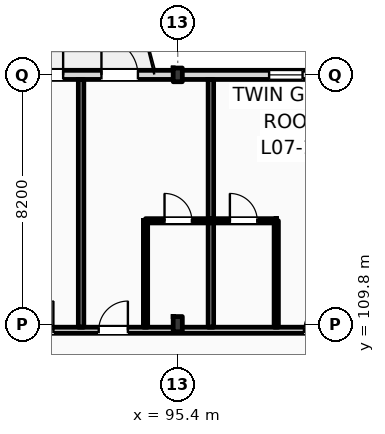
"""IFC4 building model, lengths in metres.
Left out: names, types, materials, properties, quantities, classifications, styles, units other than length and angle.
Written with IfcOpenShell. Run it as: python <this file> out.ifc"""

import sys

from ifc_helpers import new_model, si_unit, direction, frame, frame_2d, origin, origin_2d, place, context, subcontext, project, spatial, rectangle, i_section, extrude, element, fill, save


model = new_model("IFC4")
c1 = context("Model", 3, precision=1e-05, world=origin(), true_north=direction((0.0, 1.0)))
c2 = subcontext(c1, "Body", "Model", "MODEL_VIEW")
j1 = project(units=[si_unit("LENGTHUNIT", "METRE"), si_unit("PLANEANGLEUNIT", "RADIAN")], contexts=[c1])
p1 = place(None, origin())
s1 = spatial("IfcSite", under=j1, at=p1, CompositionType="ELEMENT")
p2 = place(p1, origin())
s2 = spatial("IfcBuilding", under=s1, at=p2, CompositionType="ELEMENT")
p3 = place(p2, frame((0.0, 0.0, 31.8)))
s3 = spatial("IfcBuildingStorey", under=s2, at=p3, CompositionType="ELEMENT", Elevation=31.8)
p4 = place(p3, frame((95.4, 109.8, 0.0), z_axis=(0.0, 0.0, 1.0), x_axis=(1.0, 0.0, 0.0)))
e1 = element("IfcColumn", 1, at=p4, inside=s3, PredefinedType="COLUMN", context=c2, shape_type="SweptSolid", body=[
    extrude(i_section(OverallWidth=0.3, OverallDepth=0.5, WebThickness=0.014, FlangeThickness=0.028, FilletRadius=0.027, at=origin_2d()), origin(), (0.0, 0.0, 1.0), 3.6),
])
p5 = place(p3, frame((95.4, 118.0, 0.0), z_axis=(0.0, 0.0, 1.0), x_axis=(1.0, 0.0, 0.0)))
e2 = element("IfcColumn", 2, at=p5, inside=s3, PredefinedType="COLUMN", context=c2, shape_type="SweptSolid", body=[
    extrude(i_section(OverallWidth=0.3, OverallDepth=0.45, WebThickness=0.014, FlangeThickness=0.026, FilletRadius=0.027, at=origin_2d()), origin(), (0.0, 0.0, 1.0), 3.6),
])
p6 = place(p3, frame((22.5, 118.0, 0.0), z_axis=(0.0, 0.0, 1.0), x_axis=(1.0, 0.0, 0.0)))
e3 = element("IfcWall", 3, at=p6, inside=s3, PredefinedType="STANDARD", context=c2, shape_type="SweptSolid", body=[
    extrude(rectangle(XDim=97.5, YDim=0.3, at=frame_2d((48.75, 0.0))), origin(), (0.0, 0.0, 1.0), 2.72),
])
p7 = place(p6, frame((3.61, 0.0, 0.9)))
e4 = element("IfcOpeningElement", 4, at=p7, cuts=e3, PredefinedType="OPENING", context=c2, shape_type="SweptSolid", body=[
    extrude(rectangle(XDim=1.1, YDim=1.64, at=frame_2d((0.55, 0.82))), frame((0.0, 0.16, 0.0), z_axis=(0.0, -1.0, 0.0), x_axis=(1.0, 0.0, 0.0)), (0.0, 0.0, 1.0), 0.32),
])
p8 = place(p6, frame((6.855, 0.0, 0.0)))
e5 = element("IfcOpeningElement", 5, at=p8, cuts=e3, PredefinedType="OPENING", context=c2, shape_type="SweptSolid", body=[
    extrude(rectangle(XDim=1.2, YDim=2.25, at=frame_2d((0.6, 1.125))), frame((0.0, 0.16, 0.0), z_axis=(0.0, -1.0, 0.0), x_axis=(1.0, 0.0, 0.0)), (0.0, 0.0, 1.0), 0.32),
])
p9 = place(p6, frame((11.405, 0.0, 0.9)))
e6 = element("IfcOpeningElement", 6, at=p9, cuts=e3, PredefinedType="OPENING", context=c2, shape_type="SweptSolid", body=[
    extrude(rectangle(XDim=2.1, YDim=1.64, at=frame_2d((1.05, 0.82))), frame((0.0, 0.16, 0.0), z_axis=(0.0, -1.0, 0.0), x_axis=(1.0, 0.0, 0.0)), (0.0, 0.0, 1.0), 0.32),
])
p10 = place(p6, frame((15.13, 0.0, 0.9)))
e7 = element("IfcOpeningElement", 7, at=p10, cuts=e3, PredefinedType="OPENING", context=c2, shape_type="SweptSolid", body=[
    extrude(rectangle(XDim=2.25, YDim=1.64, at=frame_2d((1.125, 0.82))), frame((0.0, 0.16, 0.0), z_axis=(0.0, -1.0, 0.0), x_axis=(1.0, 0.0, 0.0)), (0.0, 0.0, 1.0), 0.32),
])
p11 = place(p6, frame((21.53, 0.0, 0.0)))
e8 = element("IfcOpeningElement", 8, at=p11, cuts=e3, PredefinedType="OPENING", context=c2, shape_type="SweptSolid", body=[
    extrude(rectangle(XDim=1.2, YDim=2.25, at=frame_2d((0.6, 1.125))), frame((0.0, 0.16, 0.0), z_axis=(0.0, -1.0, 0.0), x_axis=(1.0, 0.0, 0.0)), (0.0, 0.0, 1.0), 0.32),
])
p12 = place(p6, frame((24.18, 0.0, 0.9)))
e9 = element("IfcOpeningElement", 9, at=p12, cuts=e3, PredefinedType="OPENING", context=c2, shape_type="SweptSolid", body=[
    extrude(rectangle(XDim=1.1, YDim=1.64, at=frame_2d((0.55, 0.82))), frame((0.0, 0.16, 0.0), z_axis=(0.0, -1.0, 0.0), x_axis=(1.0, 0.0, 0.0)), (0.0, 0.0, 1.0), 0.32),
])
p13 = place(p6, frame((29.105, 0.0, 0.9)))
e10 = element("IfcOpeningElement", 10, at=p13, cuts=e3, PredefinedType="OPENING", context=c2, shape_type="SweptSolid", body=[
    extrude(rectangle(XDim=2.7, YDim=1.64, at=frame_2d((1.35, 0.82))), frame((0.0, 0.16, 0.0), z_axis=(0.0, -1.0, 0.0), x_axis=(1.0, 0.0, 0.0)), (0.0, 0.0, 1.0), 0.32),
])
p14 = place(p6, frame((34.83, 0.0, 0.9)))
e11 = element("IfcOpeningElement", 11, at=p14, cuts=e3, PredefinedType="OPENING", context=c2, shape_type="SweptSolid", body=[
    extrude(rectangle(XDim=1.8, YDim=1.64, at=frame_2d((0.9, 0.82))), frame((0.0, 0.16, 0.0), z_axis=(0.0, -1.0, 0.0), x_axis=(1.0, 0.0, 0.0)), (0.0, 0.0, 1.0), 0.32),
])
p15 = place(p6, frame((38.525, 0.0, 0.0)))
e12 = element("IfcOpeningElement", 12, at=p15, cuts=e3, PredefinedType="OPENING", context=c2, shape_type="SweptSolid", body=[
    extrude(rectangle(XDim=1.2, YDim=2.25, at=frame_2d((0.6, 1.125))), frame((0.0, 0.16, 0.0), z_axis=(0.0, -1.0, 0.0), x_axis=(1.0, 0.0, 0.0)), (0.0, 0.0, 1.0), 0.32),
])
p16 = place(p6, frame((42.73, 0.0, 0.9)))
e13 = element("IfcOpeningElement", 13, at=p16, cuts=e3, PredefinedType="OPENING", context=c2, shape_type="SweptSolid", body=[
    extrude(rectangle(XDim=3.05, YDim=1.64, at=frame_2d((1.525, 0.82))), frame((0.0, 0.16, 0.0), z_axis=(0.0, -1.0, 0.0), x_axis=(1.0, 0.0, 0.0)), (0.0, 0.0, 1.0), 0.32),
])
p17 = place(p6, frame((47.155, 0.0, 0.9)))
e14 = element("IfcOpeningElement", 14, at=p17, cuts=e3, PredefinedType="OPENING", context=c2, shape_type="SweptSolid", body=[
    extrude(rectangle(XDim=1.35, YDim=1.64, at=frame_2d((0.675, 0.82))), frame((0.0, 0.16, 0.0), z_axis=(0.0, -1.0, 0.0), x_axis=(1.0, 0.0, 0.0)), (0.0, 0.0, 1.0), 0.32),
])
p18 = place(p6, frame((53.065, 0.0, 0.0)))
e15 = element("IfcOpeningElement", 15, at=p18, cuts=e3, PredefinedType="OPENING", context=c2, shape_type="SweptSolid", body=[
    extrude(rectangle(XDim=1.2, YDim=2.25, at=frame_2d((0.6, 1.125))), frame((0.0, 0.16, 0.0), z_axis=(0.0, -1.0, 0.0), x_axis=(1.0, 0.0, 0.0)), (0.0, 0.0, 1.0), 0.32),
])
p19 = place(p6, frame((58.2, 0.0, 0.9)))
e16 = element("IfcOpeningElement", 16, at=p19, cuts=e3, PredefinedType="OPENING", context=c2, shape_type="SweptSolid", body=[
    extrude(rectangle(XDim=1.8, YDim=1.64, at=frame_2d((0.9, 0.82))), frame((0.0, 0.16, 0.0), z_axis=(0.0, -1.0, 0.0), x_axis=(1.0, 0.0, 0.0)), (0.0, 0.0, 1.0), 0.32),
])
p20 = place(p6, frame((61.13, 0.0, 0.9)))
e17 = element("IfcOpeningElement", 17, at=p20, cuts=e3, PredefinedType="OPENING", context=c2, shape_type="SweptSolid", body=[
    extrude(rectangle(XDim=3.05, YDim=1.64, at=frame_2d((1.525, 0.82))), frame((0.0, 0.16, 0.0), z_axis=(0.0, -1.0, 0.0), x_axis=(1.0, 0.0, 0.0)), (0.0, 0.0, 1.0), 0.32),
])
p21 = place(p6, frame((67.93, 0.0, 0.0)))
e18 = element("IfcOpeningElement", 18, at=p21, cuts=e3, PredefinedType="OPENING", context=c2, shape_type="SweptSolid", body=[
    extrude(rectangle(XDim=1.2, YDim=2.25, at=frame_2d((0.6, 1.125))), frame((0.0, 0.16, 0.0), z_axis=(0.0, -1.0, 0.0), x_axis=(1.0, 0.0, 0.0)), (0.0, 0.0, 1.0), 0.32),
])
p22 = place(p6, frame((70.39, 0.0, 0.0)))
e19 = element("IfcOpeningElement", 19, at=p22, cuts=e3, PredefinedType="OPENING", context=c2, shape_type="SweptSolid", body=[
    extrude(rectangle(XDim=1.2, YDim=2.25, at=frame_2d((0.6, 1.125))), frame((0.0, 0.16, 0.0), z_axis=(0.0, -1.0, 0.0), x_axis=(1.0, 0.0, 0.0)), (0.0, 0.0, 1.0), 0.32),
])
p23 = place(p6, frame((75.905, 0.0, 0.9)))
e20 = element("IfcOpeningElement", 20, at=p23, cuts=e3, PredefinedType="OPENING", context=c2, shape_type="SweptSolid", body=[
    extrude(rectangle(XDim=1.1, YDim=1.5, at=frame_2d((0.55, 0.75))), frame((0.0, 0.16, 0.0), z_axis=(0.0, -1.0, 0.0), x_axis=(1.0, 0.0, 0.0)), (0.0, 0.0, 1.0), 0.32),
])
p24 = place(p6, frame((81.63, 0.0, 0.9)))
e21 = element("IfcOpeningElement", 21, at=p24, cuts=e3, PredefinedType="OPENING", context=c2, shape_type="SweptSolid", body=[
    extrude(rectangle(XDim=1.1, YDim=1.6, at=frame_2d((0.55, 0.8))), frame((0.0, 0.16, 0.0), z_axis=(0.0, -1.0, 0.0), x_axis=(1.0, 0.0, 0.0)), (0.0, 0.0, 1.0), 0.32),
])
p25 = place(p6, frame((84.955, 0.0, 0.9)))
e22 = element("IfcOpeningElement", 22, at=p25, cuts=e3, PredefinedType="OPENING", context=c2, shape_type="SweptSolid", body=[
    extrude(rectangle(XDim=1.4, YDim=1.64, at=frame_2d((0.7, 0.82))), frame((0.0, 0.16, 0.0), z_axis=(0.0, -1.0, 0.0), x_axis=(1.0, 0.0, 0.0)), (0.0, 0.0, 1.0), 0.32),
])
p26 = place(p6, frame((90.055, 0.0, 0.9)))
e23 = element("IfcOpeningElement", 23, at=p26, cuts=e3, PredefinedType="OPENING", context=c2, shape_type="SweptSolid", body=[
    extrude(rectangle(XDim=1.6, YDim=1.64, at=frame_2d((0.8, 0.82))), frame((0.0, 0.16, 0.0), z_axis=(0.0, -1.0, 0.0), x_axis=(1.0, 0.0, 0.0)), (0.0, 0.0, 1.0), 0.32),
])
p27 = place(p6, frame((93.87, 0.0, 0.9)))
e24 = element("IfcOpeningElement", 24, at=p27, cuts=e3, PredefinedType="OPENING", context=c2, shape_type="SweptSolid", body=[
    extrude(rectangle(XDim=1.75, YDim=1.64, at=frame_2d((0.875, 0.82))), frame((0.0, 0.16, 0.0), z_axis=(0.0, -1.0, 0.0), x_axis=(1.0, 0.0, 0.0)), (0.0, 0.0, 1.0), 0.32),
])
p28 = place(p3, frame((10.65, 109.6, 0.0), z_axis=(0.0, 0.0, 1.0), x_axis=(1.0, 0.0, 0.0)))
e25 = element("IfcWall", 25, at=p28, inside=s3, PredefinedType="PARTITIONING", context=c2, shape_type="SweptSolid", body=[
    extrude(rectangle(XDim=109.21, YDim=0.2, at=frame_2d((54.605, 0.0))), origin(), (0.0, 0.0, 1.0), 2.72),
])
p29 = place(p28, frame((15.825, 0.0, 0.0)))
e26 = element("IfcOpeningElement", 26, at=p29, cuts=e25, PredefinedType="OPENING", context=c2, shape_type="SweptSolid", body=[
    extrude(rectangle(XDim=1.02, YDim=2.2, at=frame_2d((0.51, 1.1))), frame((0.0, 0.11, 0.0), z_axis=(0.0, -1.0, 0.0), x_axis=(1.0, 0.0, 0.0)), (0.0, 0.0, 1.0), 0.22),
])
p30 = place(p28, frame((19.87, 0.0, 0.0)))
e27 = element("IfcOpeningElement", 27, at=p30, cuts=e25, PredefinedType="OPENING", context=c2, shape_type="SweptSolid", body=[
    extrude(rectangle(XDim=1.02, YDim=2.2, at=frame_2d((0.51, 1.1))), frame((0.0, 0.11, 0.0), z_axis=(0.0, -1.0, 0.0), x_axis=(1.0, 0.0, 0.0)), (0.0, 0.0, 1.0), 0.22),
])
p31 = place(p28, frame((24.47, 0.0, 0.0)))
e28 = element("IfcOpeningElement", 28, at=p31, cuts=e25, PredefinedType="OPENING", context=c2, shape_type="SweptSolid", body=[
    extrude(rectangle(XDim=1.02, YDim=2.2, at=frame_2d((0.51, 1.1))), frame((0.0, 0.11, 0.0), z_axis=(0.0, -1.0, 0.0), x_axis=(1.0, 0.0, 0.0)), (0.0, 0.0, 1.0), 0.22),
])
p32 = place(p28, frame((26.92, 0.0, 0.0)))
e29 = element("IfcOpeningElement", 29, at=p32, cuts=e25, PredefinedType="OPENING", context=c2, shape_type="SweptSolid", body=[
    extrude(rectangle(XDim=1.02, YDim=2.2, at=frame_2d((0.51, 1.1))), frame((0.0, 0.11, 0.0), z_axis=(0.0, -1.0, 0.0), x_axis=(1.0, 0.0, 0.0)), (0.0, 0.0, 1.0), 0.22),
])
p33 = place(p28, frame((33.7, 0.0, 0.0)))
e30 = element("IfcOpeningElement", 30, at=p33, cuts=e25, PredefinedType="OPENING", context=c2, shape_type="SweptSolid", body=[
    extrude(rectangle(XDim=0.96, YDim=2.2, at=frame_2d((0.48, 1.1))), frame((0.0, 0.11, 0.0), z_axis=(0.0, -1.0, 0.0), x_axis=(1.0, 0.0, 0.0)), (0.0, 0.0, 1.0), 0.22),
])
p34 = place(p28, frame((35.9, 0.0, 0.0)))
e31 = element("IfcOpeningElement", 31, at=p34, cuts=e25, PredefinedType="OPENING", context=c2, shape_type="SweptSolid", body=[
    extrude(rectangle(XDim=0.96, YDim=2.2, at=frame_2d((0.48, 1.1))), frame((0.0, 0.11, 0.0), z_axis=(0.0, -1.0, 0.0), x_axis=(1.0, 0.0, 0.0)), (0.0, 0.0, 1.0), 0.22),
])
p35 = place(p28, frame((42.9, 0.0, 0.0)))
e32 = element("IfcOpeningElement", 32, at=p35, cuts=e25, PredefinedType="OPENING", context=c2, shape_type="SweptSolid", body=[
    extrude(rectangle(XDim=0.96, YDim=2.2, at=frame_2d((0.48, 1.1))), frame((0.0, 0.11, 0.0), z_axis=(0.0, -1.0, 0.0), x_axis=(1.0, 0.0, 0.0)), (0.0, 0.0, 1.0), 0.22),
])
p36 = place(p28, frame((47.5, 0.0, 0.0)))
e33 = element("IfcOpeningElement", 33, at=p36, cuts=e25, PredefinedType="OPENING", context=c2, shape_type="SweptSolid", body=[
    extrude(rectangle(XDim=0.96, YDim=2.2, at=frame_2d((0.48, 1.1))), frame((0.0, 0.11, 0.0), z_axis=(0.0, -1.0, 0.0), x_axis=(1.0, 0.0, 0.0)), (0.0, 0.0, 1.0), 0.22),
])
p37 = place(p28, frame((49.95, 0.0, 0.0)))
e34 = element("IfcOpeningElement", 34, at=p37, cuts=e25, PredefinedType="OPENING", context=c2, shape_type="SweptSolid", body=[
    extrude(rectangle(XDim=0.96, YDim=2.2, at=frame_2d((0.48, 1.1))), frame((0.0, 0.11, 0.0), z_axis=(0.0, -1.0, 0.0), x_axis=(1.0, 0.0, 0.0)), (0.0, 0.0, 1.0), 0.22),
])
p38 = place(p28, frame((56.7, 0.0, 0.0)))
e35 = element("IfcOpeningElement", 35, at=p38, cuts=e25, PredefinedType="OPENING", context=c2, shape_type="SweptSolid", body=[
    extrude(rectangle(XDim=0.96, YDim=2.2, at=frame_2d((0.48, 1.1))), frame((0.0, 0.11, 0.0), z_axis=(0.0, -1.0, 0.0), x_axis=(1.0, 0.0, 0.0)), (0.0, 0.0, 1.0), 0.22),
])
p39 = place(p28, frame((59.15, 0.0, 0.0)))
e36 = element("IfcOpeningElement", 36, at=p39, cuts=e25, PredefinedType="OPENING", context=c2, shape_type="SweptSolid", body=[
    extrude(rectangle(XDim=0.96, YDim=2.2, at=frame_2d((0.48, 1.1))), frame((0.0, 0.11, 0.0), z_axis=(0.0, -1.0, 0.0), x_axis=(1.0, 0.0, 0.0)), (0.0, 0.0, 1.0), 0.22),
])
p40 = place(p28, frame((65.9, 0.0, 0.0)))
e37 = element("IfcOpeningElement", 37, at=p40, cuts=e25, PredefinedType="OPENING", context=c2, shape_type="SweptSolid", body=[
    extrude(rectangle(XDim=0.96, YDim=2.2, at=frame_2d((0.48, 1.1))), frame((0.0, 0.11, 0.0), z_axis=(0.0, -1.0, 0.0), x_axis=(1.0, 0.0, 0.0)), (0.0, 0.0, 1.0), 0.22),
])
p41 = place(p28, frame((70.5, 0.0, 0.0)))
e38 = element("IfcOpeningElement", 38, at=p41, cuts=e25, PredefinedType="OPENING", context=c2, shape_type="SweptSolid", body=[
    extrude(rectangle(XDim=0.96, YDim=2.2, at=frame_2d((0.48, 1.1))), frame((0.0, 0.11, 0.0), z_axis=(0.0, -1.0, 0.0), x_axis=(1.0, 0.0, 0.0)), (0.0, 0.0, 1.0), 0.22),
])
p42 = place(p28, frame((72.95, 0.0, 0.0)))
e39 = element("IfcOpeningElement", 39, at=p42, cuts=e25, PredefinedType="OPENING", context=c2, shape_type="SweptSolid", body=[
    extrude(rectangle(XDim=0.96, YDim=2.2, at=frame_2d((0.48, 1.1))), frame((0.0, 0.11, 0.0), z_axis=(0.0, -1.0, 0.0), x_axis=(1.0, 0.0, 0.0)), (0.0, 0.0, 1.0), 0.22),
])
p43 = place(p28, frame((79.7, 0.0, 0.0)))
e40 = element("IfcOpeningElement", 40, at=p43, cuts=e25, PredefinedType="OPENING", context=c2, shape_type="SweptSolid", body=[
    extrude(rectangle(XDim=0.96, YDim=2.2, at=frame_2d((0.48, 1.1))), frame((0.0, 0.11, 0.0), z_axis=(0.0, -1.0, 0.0), x_axis=(1.0, 0.0, 0.0)), (0.0, 0.0, 1.0), 0.22),
])
p44 = place(p28, frame((82.15, 0.0, 0.0)))
e41 = element("IfcOpeningElement", 41, at=p44, cuts=e25, PredefinedType="OPENING", context=c2, shape_type="SweptSolid", body=[
    extrude(rectangle(XDim=0.96, YDim=2.2, at=frame_2d((0.48, 1.1))), frame((0.0, 0.11, 0.0), z_axis=(0.0, -1.0, 0.0), x_axis=(1.0, 0.0, 0.0)), (0.0, 0.0, 1.0), 0.22),
])
p45 = place(p28, frame((88.9, 0.0, 0.0)))
e42 = element("IfcOpeningElement", 42, at=p45, cuts=e25, PredefinedType="OPENING", context=c2, shape_type="SweptSolid", body=[
    extrude(rectangle(XDim=0.96, YDim=2.2, at=frame_2d((0.48, 1.1))), frame((0.0, 0.11, 0.0), z_axis=(0.0, -1.0, 0.0), x_axis=(1.0, 0.0, 0.0)), (0.0, 0.0, 1.0), 0.22),
])
p46 = place(p28, frame((93.75, 0.0, 0.0)))
e43 = element("IfcOpeningElement", 43, at=p46, cuts=e25, PredefinedType="OPENING", context=c2, shape_type="SweptSolid", body=[
    extrude(rectangle(XDim=0.96, YDim=2.2, at=frame_2d((0.48, 1.1))), frame((0.0, 0.11, 0.0), z_axis=(0.0, -1.0, 0.0), x_axis=(1.0, 0.0, 0.0)), (0.0, 0.0, 1.0), 0.22),
])
p47 = place(p28, frame((98.1, 0.0, 0.0)))
e44 = element("IfcOpeningElement", 44, at=p47, cuts=e25, PredefinedType="OPENING", context=c2, shape_type="SweptSolid", body=[
    extrude(rectangle(XDim=0.96, YDim=2.2, at=frame_2d((0.48, 1.1))), frame((0.0, 0.11, 0.0), z_axis=(0.0, -1.0, 0.0), x_axis=(1.0, 0.0, 0.0)), (0.0, 0.0, 1.0), 0.22),
])
p48 = place(p28, frame((102.7, 0.0, 0.0)))
e45 = element("IfcOpeningElement", 45, at=p48, cuts=e25, PredefinedType="OPENING", context=c2, shape_type="SweptSolid", body=[
    extrude(rectangle(XDim=0.96, YDim=2.2, at=frame_2d((0.48, 1.1))), frame((0.0, 0.11, 0.0), z_axis=(0.0, -1.0, 0.0), x_axis=(1.0, 0.0, 0.0)), (0.0, 0.0, 1.0), 0.22),
])
p49 = place(p28, frame((105.04, 0.0, 0.0)))
e46 = element("IfcOpeningElement", 46, at=p49, cuts=e25, PredefinedType="OPENING", context=c2, shape_type="SweptSolid", body=[
    extrude(rectangle(XDim=0.96, YDim=2.2, at=frame_2d((0.48, 1.1))), frame((0.0, 0.11, 0.0), z_axis=(0.0, -1.0, 0.0), x_axis=(1.0, 0.0, 0.0)), (0.0, 0.0, 1.0), 0.22),
])
p50 = place(p28, frame((2.716, 0.0, 0.0)))
e47 = element("IfcOpeningElement", 47, at=p50, cuts=e25, PredefinedType="OPENING", context=c2, shape_type="SweptSolid", body=[
    extrude(rectangle(XDim=1.35, YDim=2.25, at=frame_2d((0.675, 1.125))), frame((0.0, 0.11, 0.0), z_axis=(0.0, -1.0, 0.0), x_axis=(1.0, 0.0, 0.0)), (0.0, 0.0, 1.0), 0.22),
])
p51 = place(p28, frame((6.65, 0.0, 0.0)))
e48 = element("IfcOpeningElement", 48, at=p51, cuts=e25, PredefinedType="OPENING", context=c2, shape_type="SweptSolid", body=[
    extrude(rectangle(XDim=1.35, YDim=2.25, at=frame_2d((0.675, 1.125))), frame((0.0, 0.11, 0.0), z_axis=(0.0, -1.0, 0.0), x_axis=(1.0, 0.0, 0.0)), (0.0, 0.0, 1.0), 0.22),
])
p52 = place(p28, frame((10.583, 0.0, 0.0)))
e49 = element("IfcOpeningElement", 49, at=p52, cuts=e25, PredefinedType="OPENING", context=c2, shape_type="SweptSolid", body=[
    extrude(rectangle(XDim=1.35, YDim=2.25, at=frame_2d((0.675, 1.125))), frame((0.0, 0.11, 0.0), z_axis=(0.0, -1.0, 0.0), x_axis=(1.0, 0.0, 0.0)), (0.0, 0.0, 1.0), 0.22),
])
for number, where, z_axis, x_axis in (
    (50, (92.22, 109.7, 0.0), (0.0, 0.0, 1.0), (0.0, 1.0, 0.0)),
    (51, (96.49, 109.7, 0.0), (0.0, 0.0, 1.0), (0.0, 1.0, 0.0)),
):
    element("IfcWall", number, at=place(p3, frame(where, z_axis=z_axis, x_axis=x_axis)), inside=s3, PredefinedType="PARTITIONING", context=c2, shape_type="SweptSolid", body=[
        extrude(rectangle(XDim=8.15, YDim=0.18, at=frame_2d((4.075, 0.0))), origin(), (0.0, 0.0, 1.0), 3.36),
    ])
p53 = place(p3, frame((94.34, 109.7, 0.0), z_axis=(0.0, 0.0, 1.0), x_axis=(0.0, 1.0, 0.0)))
e52 = element("IfcWall", 52, at=p53, inside=s3, PredefinedType="PARTITIONING", context=c2, shape_type="SweptSolid", body=[
    extrude(rectangle(XDim=3.5, YDim=0.14, at=frame_2d((1.75, 0.0))), origin(), (0.0, 0.0, 1.0), 3.36),
])
p54 = place(p3, frame((94.34, 113.2, 0.0), z_axis=(0.0, 0.0, 1.0), x_axis=(1.0, 0.0, 0.0)))
e53 = element("IfcWall", 53, at=p54, inside=s3, PredefinedType="PARTITIONING", context=c2, shape_type="SweptSolid", body=[
    extrude(rectangle(XDim=2.15, YDim=0.14, at=frame_2d((1.075, 0.0))), origin(), (0.0, 0.0, 1.0), 3.36),
])
p55 = place(p54, frame((0.625, 0.0, 0.0)))
e54 = element("IfcOpeningElement", 54, at=p55, cuts=e53, PredefinedType="OPENING", context=c2, shape_type="SweptSolid", body=[
    extrude(rectangle(XDim=0.9, YDim=2.1, at=frame_2d((0.45, 1.05))), frame((0.0, 0.08, 0.0), z_axis=(0.0, -1.0, 0.0), x_axis=(1.0, 0.0, 0.0)), (0.0, 0.0, 1.0), 0.16),
])
p56 = place(p3, frame((98.64, 109.7, 0.0), z_axis=(0.0, 0.0, 1.0), x_axis=(0.0, 1.0, 0.0)))
e55 = element("IfcWall", 55, at=p56, inside=s3, PredefinedType="PARTITIONING", context=c2, shape_type="SweptSolid", body=[
    extrude(rectangle(XDim=3.5, YDim=0.14, at=frame_2d((1.75, 0.0))), origin(), (0.0, 0.0, 1.0), 3.36),
])
p57 = place(p3, frame((96.49, 113.2, 0.0), z_axis=(0.0, 0.0, 1.0), x_axis=(1.0, 0.0, 0.0)))
e56 = element("IfcWall", 56, at=p57, inside=s3, PredefinedType="PARTITIONING", context=c2, shape_type="SweptSolid", body=[
    extrude(rectangle(XDim=2.15, YDim=0.14, at=frame_2d((1.075, 0.0))), origin(), (0.0, 0.0, 1.0), 3.36),
])
p58 = place(p57, frame((0.625, 0.0, 0.0)))
e57 = element("IfcOpeningElement", 57, at=p58, cuts=e56, PredefinedType="OPENING", context=c2, shape_type="SweptSolid", body=[
    extrude(rectangle(XDim=0.9, YDim=2.1, at=frame_2d((0.45, 1.05))), frame((0.0, 0.08, 0.0), z_axis=(0.0, -1.0, 0.0), x_axis=(1.0, 0.0, 0.0)), (0.0, 0.0, 1.0), 0.16),
])
p59 = place(p21, origin())
e58 = element("IfcDoor", 58, at=p59, inside=s3, OperationType="SINGLE_SWING_RIGHT", PredefinedType="DOOR", context=c2, shape_type="SweptSolid", body=[
    extrude(rectangle(XDim=1.2, YDim=2.25, at=frame_2d((0.6, 1.125))), frame((0.0, 0.025, 0.0), z_axis=(0.0, -1.0, 0.0), x_axis=(1.0, 0.0, 0.0)), (0.0, 0.0, 1.0), 0.05),
])
fill(e18, e58)
p60 = place(p22, origin())
e59 = element("IfcDoor", 59, at=p60, inside=s3, OperationType="SINGLE_SWING_LEFT", PredefinedType="DOOR", context=c2, shape_type="SweptSolid", body=[
    extrude(rectangle(XDim=1.2, YDim=2.25, at=frame_2d((0.6, 1.125))), frame((0.0, 0.025, 0.0), z_axis=(0.0, -1.0, 0.0), x_axis=(1.0, 0.0, 0.0)), (0.0, 0.0, 1.0), 0.05),
])
fill(e19, e59)
p61 = place(p23, origin())
e60 = element("IfcWindow", 60, at=p61, inside=s3, PartitioningType="DOUBLE_PANEL_VERTICAL", PredefinedType="WINDOW", context=c2, shape_type="SweptSolid", body=[
    extrude(rectangle(XDim=1.1, YDim=1.5, at=frame_2d((0.55, 0.75))), frame((0.0, 0.03, 0.0), z_axis=(0.0, -1.0, 0.0), x_axis=(1.0, 0.0, 0.0)), (0.0, 0.0, 1.0), 0.06),
])
fill(e20, e60)
p62 = place(p43, origin())
e61 = element("IfcDoor", 61, at=p62, inside=s3, OperationType="SINGLE_SWING_RIGHT", PredefinedType="DOOR", context=c2, shape_type="SweptSolid", body=[
    extrude(rectangle(XDim=0.96, YDim=2.2, at=frame_2d((0.48, 1.1))), frame((0.0, 0.025, 0.0), z_axis=(0.0, -1.0, 0.0), x_axis=(1.0, 0.0, 0.0)), (0.0, 0.0, 1.0), 0.05),
])
fill(e40, e61)
p63 = place(p44, origin())
e62 = element("IfcDoor", 62, at=p63, inside=s3, OperationType="SINGLE_SWING_RIGHT", PredefinedType="DOOR", context=c2, shape_type="SweptSolid", body=[
    extrude(rectangle(XDim=0.96, YDim=2.2, at=frame_2d((0.48, 1.1))), frame((0.0, 0.025, 0.0), z_axis=(0.0, -1.0, 0.0), x_axis=(1.0, 0.0, 0.0)), (0.0, 0.0, 1.0), 0.05),
])
fill(e41, e62)
p64 = place(p55, origin())
e63 = element("IfcDoor", 63, at=p64, inside=s3, OperationType="SINGLE_SWING_LEFT", PredefinedType="DOOR", context=c2, shape_type="SweptSolid", body=[
    extrude(rectangle(XDim=0.9, YDim=2.1, at=frame_2d((0.45, 1.05))), frame((0.0, 0.025, 0.0), z_axis=(0.0, -1.0, 0.0), x_axis=(1.0, 0.0, 0.0)), (0.0, 0.0, 1.0), 0.05),
])
fill(e54, e63)
p65 = place(p45, origin())
e64 = element("IfcDoor", 64, at=p65, inside=s3, OperationType="SINGLE_SWING_RIGHT", PredefinedType="DOOR", context=c2, shape_type="SweptSolid", body=[
    extrude(rectangle(XDim=0.96, YDim=2.2, at=frame_2d((0.48, 1.1))), frame((0.0, 0.025, 0.0), z_axis=(0.0, -1.0, 0.0), x_axis=(1.0, 0.0, 0.0)), (0.0, 0.0, 1.0), 0.05),
])
fill(e42, e64)
p66 = place(p58, origin())
e65 = element("IfcDoor", 65, at=p66, inside=s3, OperationType="SINGLE_SWING_LEFT", PredefinedType="DOOR", context=c2, shape_type="SweptSolid", body=[
    extrude(rectangle(XDim=0.9, YDim=2.1, at=frame_2d((0.45, 1.05))), frame((0.0, 0.025, 0.0), z_axis=(0.0, -1.0, 0.0), x_axis=(1.0, 0.0, 0.0)), (0.0, 0.0, 1.0), 0.05),
])
fill(e57, e65)
save(model, sys.argv[1])
